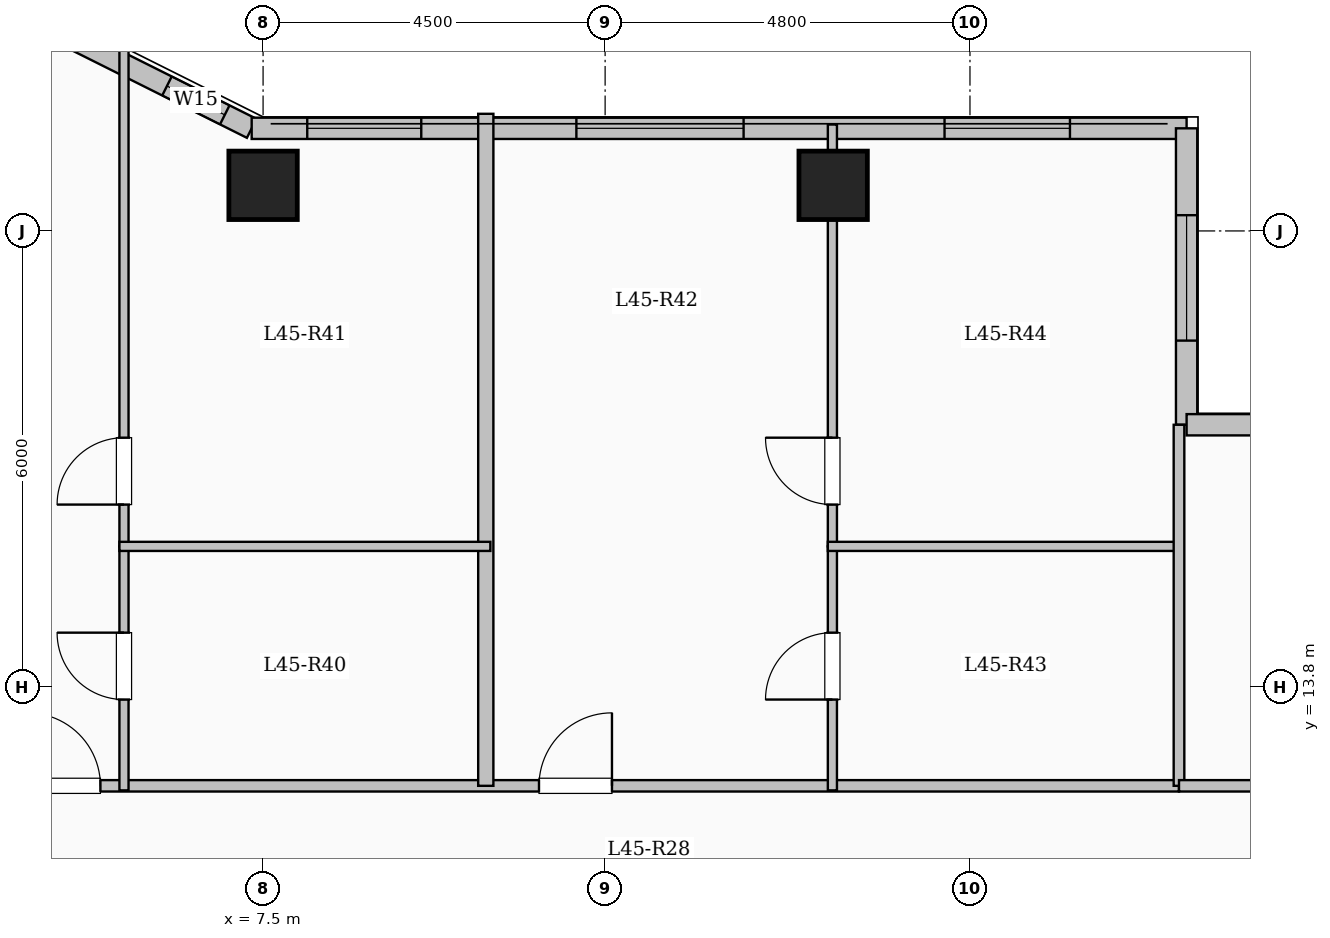
"""IFC4 building model, lengths in metres.
Left out: names, types, materials, properties, quantities, classifications, styles, units other than length and angle.
Written with IfcOpenShell. Run it as: python <this file> out.ifc"""

import sys

from ifc_helpers import new_model, si_unit, direction, frame, frame_2d, origin, origin_2d, place, context, subcontext, project, spatial, rectangle, extrude, element, fill, save


model = new_model("IFC4")
c1 = context("Model", 3, precision=1e-05, world=origin(), true_north=direction((0.0, 1.0)))
c2 = subcontext(c1, "Body", "Model", "MODEL_VIEW")
j1 = project(units=[si_unit("LENGTHUNIT", "METRE"), si_unit("PLANEANGLEUNIT", "RADIAN")], contexts=[c1])
p1 = place(None, origin())
s1 = spatial("IfcSite", under=j1, at=p1, CompositionType="ELEMENT")
p2 = place(p1, origin())
s2 = spatial("IfcBuilding", under=s1, at=p2, CompositionType="ELEMENT")
p3 = place(p2, frame((0.0, 0.0, 166.1)))
s3 = spatial("IfcBuildingStorey", under=s2, at=p3, CompositionType="ELEMENT", Elevation=166.1)
for number, where, z_axis, x_axis in (
    (1, (7.5, 20.4, 0.0), (0.0, 0.0, 1.0), (1.0, 0.0, 0.0)),
    (2, (15.0, 20.4, 0.0), (0.0, 0.0, 1.0), (1.0, 0.0, 0.0)),
):
    element("IfcColumn", number, at=place(p3, frame(where, z_axis=z_axis, x_axis=x_axis)), inside=s3, PredefinedType="COLUMN", context=c2, shape_type="SweptSolid", body=[
        extrude(rectangle(XDim=0.9, YDim=0.9, at=origin_2d()), origin(), (0.0, 0.0, 1.0), 3.35),
    ])
p4 = place(p3, frame((4.35, 22.65, 0.0), z_axis=(0.0, 0.0, 1.0), x_axis=(0.894427191, -0.4472135955, 0.0)))
e3 = element("IfcWall", 3, at=p4, inside=s3, PredefinedType="SOLIDWALL", context=c2, shape_type="SweptSolid", body=[
    extrude(rectangle(XDim=3.354, YDim=0.28, at=frame_2d((1.677, 0.0))), origin(), (0.0, 0.0, 1.0), 3.1),
])
p5 = place(p4, frame((2.108, 0.0, 0.95)))
e4 = element("IfcOpeningElement", 4, at=p5, cuts=e3, PredefinedType="OPENING", context=c2, shape_type="SweptSolid", body=[
    extrude(rectangle(XDim=0.85, YDim=1.5, at=frame_2d((0.425, 0.75))), frame((0.0, 0.15, 0.0), z_axis=(0.0, -1.0, 0.0), x_axis=(1.0, 0.0, 0.0)), (0.0, 0.0, 1.0), 0.3),
])
p6 = place(p3, frame((7.35, 21.15, 0.0), z_axis=(0.0, 0.0, 1.0), x_axis=(1.0, 0.0, 0.0)))
e5 = element("IfcWall", 5, at=p6, inside=s3, PredefinedType="SOLIDWALL", context=c2, shape_type="SweptSolid", body=[
    extrude(rectangle(XDim=12.3, YDim=0.28, at=frame_2d((6.15, 0.0))), origin(), (0.0, 0.0, 1.0), 3.1),
])
p7 = place(p6, frame((0.731, 0.0, 0.9)))
e6 = element("IfcOpeningElement", 6, at=p7, cuts=e5, PredefinedType="OPENING", context=c2, shape_type="SweptSolid", body=[
    extrude(rectangle(XDim=1.5, YDim=1.65, at=frame_2d((0.75, 0.825))), frame((0.0, 0.15, 0.0), z_axis=(0.0, -1.0, 0.0), x_axis=(1.0, 0.0, 0.0)), (0.0, 0.0, 1.0), 0.3),
])
p8 = place(p6, frame((4.272, 0.0, 0.9)))
e7 = element("IfcOpeningElement", 7, at=p8, cuts=e5, PredefinedType="OPENING", context=c2, shape_type="SweptSolid", body=[
    extrude(rectangle(XDim=2.2, YDim=1.75, at=frame_2d((1.1, 0.875))), frame((0.0, 0.15, 0.0), z_axis=(0.0, -1.0, 0.0), x_axis=(1.0, 0.0, 0.0)), (0.0, 0.0, 1.0), 0.3),
])
p9 = place(p6, frame((9.115, 0.0, 0.9)))
e8 = element("IfcOpeningElement", 8, at=p9, cuts=e5, PredefinedType="OPENING", context=c2, shape_type="SweptSolid", body=[
    extrude(rectangle(XDim=1.65, YDim=1.6, at=frame_2d((0.825, 0.8))), frame((0.0, 0.15, 0.0), z_axis=(0.0, -1.0, 0.0), x_axis=(1.0, 0.0, 0.0)), (0.0, 0.0, 1.0), 0.3),
])
p10 = place(p3, frame((19.65, 21.15, 0.0), z_axis=(0.0, 0.0, 1.0), x_axis=(0.0, -1.0, 0.0)))
e9 = element("IfcWall", 9, at=p10, inside=s3, PredefinedType="SOLIDWALL", context=c2, shape_type="SweptSolid", body=[
    extrude(rectangle(XDim=3.9, YDim=0.28, at=frame_2d((1.95, 0.0))), origin(), (0.0, 0.0, 1.0), 3.1),
])
p11 = place(p10, frame((1.143, 0.0, 0.9)))
e10 = element("IfcOpeningElement", 10, at=p11, cuts=e9, PredefinedType="OPENING", context=c2, shape_type="SweptSolid", body=[
    extrude(rectangle(XDim=1.65, YDim=1.6, at=frame_2d((0.825, 0.8))), frame((0.0, 0.15, 0.0), z_axis=(0.0, -1.0, 0.0), x_axis=(1.0, 0.0, 0.0)), (0.0, 0.0, 1.0), 0.3),
])
p12 = place(p3, frame((19.65, 17.25, 0.0), z_axis=(0.0, 0.0, 1.0), x_axis=(1.0, 0.0, 0.0)))
e11 = element("IfcWall", 11, at=p12, inside=s3, PredefinedType="SOLIDWALL", context=c2, shape_type="SweptSolid", body=[
    extrude(rectangle(XDim=5.4, YDim=0.28, at=frame_2d((2.7, 0.0))), origin(), (0.0, 0.0, 1.0), 3.1),
])
p13 = place(p12, frame((1.675, 0.0, 0.9)))
e12 = element("IfcOpeningElement", 12, at=p13, cuts=e11, PredefinedType="OPENING", context=c2, shape_type="SweptSolid", body=[
    extrude(rectangle(XDim=2.0, YDim=1.7, at=frame_2d((1.0, 0.85))), frame((0.0, 0.15, 0.0), z_axis=(0.0, -1.0, 0.0), x_axis=(1.0, 0.0, 0.0)), (0.0, 0.0, 1.0), 0.3),
])
p14 = place(p3, frame((3.85, 12.5, 0.0), z_axis=(0.0, 0.0, 1.0), x_axis=(1.0, 0.0, 0.0)))
e13 = element("IfcWall", 13, at=p14, inside=s3, PredefinedType="PARTITIONING", context=c2, shape_type="SweptSolid", body=[
    extrude(rectangle(XDim=15.7, YDim=0.15, at=frame_2d((7.85, 0.0))), origin(), (0.0, 0.0, 1.0), 3.1),
])
p15 = place(p14, frame((0.55, 0.0, 0.0)))
e14 = element("IfcOpeningElement", 14, at=p15, cuts=e13, PredefinedType="OPENING", context=c2, shape_type="SweptSolid", body=[
    extrude(rectangle(XDim=0.96, YDim=2.15, at=frame_2d((0.48, 1.075))), frame((0.0, 0.085, 0.0), z_axis=(0.0, -1.0, 0.0), x_axis=(1.0, 0.0, 0.0)), (0.0, 0.0, 1.0), 0.17),
])
p16 = place(p14, frame((7.28, 0.0, 0.0)))
e15 = element("IfcOpeningElement", 15, at=p16, cuts=e13, PredefinedType="OPENING", context=c2, shape_type="SweptSolid", body=[
    extrude(rectangle(XDim=0.96, YDim=2.15, at=frame_2d((0.48, 1.075))), frame((0.0, 0.085, 0.0), z_axis=(0.0, -1.0, 0.0), x_axis=(1.0, 0.0, 0.0)), (0.0, 0.0, 1.0), 0.17),
])
p17 = place(p3, frame((10.43, 12.5, 0.0), z_axis=(0.0, 0.0, 1.0), x_axis=(0.0, 1.0, 0.0)))
e16 = element("IfcWall", 16, at=p17, inside=s3, PredefinedType="SOLIDWALL", context=c2, shape_type="SweptSolid", body=[
    extrude(rectangle(XDim=8.841, YDim=0.2, at=frame_2d((4.42, 0.0))), origin(), (0.0, 0.0, 1.0), 3.1),
])
p18 = place(p3, frame((5.67, 12.44, 0.0), z_axis=(0.0, 0.0, 1.0), x_axis=(0.0, 1.0, 0.0)))
e17 = element("IfcWall", 17, at=p18, inside=s3, PredefinedType="PARTITIONING", context=c2, shape_type="SweptSolid", body=[
    extrude(rectangle(XDim=3.21, YDim=0.12, at=frame_2d((1.605, 0.0))), origin(), (0.0, 0.0, 1.0), 3.1),
])
p19 = place(p18, frame((1.195, 0.0, 0.0)))
e18 = element("IfcOpeningElement", 18, at=p19, cuts=e17, PredefinedType="OPENING", context=c2, shape_type="SweptSolid", body=[
    extrude(rectangle(XDim=0.88, YDim=2.1, at=frame_2d((0.44, 1.05))), frame((0.0, 0.07, 0.0), z_axis=(0.0, -1.0, 0.0), x_axis=(1.0, 0.0, 0.0)), (0.0, 0.0, 1.0), 0.14),
])
p20 = place(p3, frame((5.67, 15.65, 0.0), z_axis=(0.0, 0.0, 1.0), x_axis=(0.0, 1.0, 0.0)))
e19 = element("IfcWall", 19, at=p20, inside=s3, PredefinedType="PARTITIONING", context=c2, shape_type="SweptSolid", body=[
    extrude(rectangle(XDim=6.865, YDim=0.12, at=frame_2d((3.433, 0.0))), origin(), (0.0, 0.0, 1.0), 3.1),
])
p21 = place(p20, frame((0.55, 0.0, 0.0)))
e20 = element("IfcOpeningElement", 20, at=p21, cuts=e19, PredefinedType="OPENING", context=c2, shape_type="SweptSolid", body=[
    extrude(rectangle(XDim=0.88, YDim=2.1, at=frame_2d((0.44, 1.05))), frame((0.0, 0.07, 0.0), z_axis=(0.0, -1.0, 0.0), x_axis=(1.0, 0.0, 0.0)), (0.0, 0.0, 1.0), 0.14),
])
p22 = place(p3, frame((5.61, 15.65, 0.0), z_axis=(0.0, 0.0, 1.0), x_axis=(1.0, 0.0, 0.0)))
e21 = element("IfcWall", 21, at=p22, inside=s3, PredefinedType="PARTITIONING", context=c2, shape_type="SweptSolid", body=[
    extrude(rectangle(XDim=4.88, YDim=0.12, at=frame_2d((2.44, 0.0))), origin(), (0.0, 0.0, 1.0), 2.685),
])
p23 = place(p3, frame((14.99, 12.44, 0.0), z_axis=(0.0, 0.0, 1.0), x_axis=(0.0, 1.0, 0.0)))
e22 = element("IfcWall", 22, at=p23, inside=s3, PredefinedType="PARTITIONING", context=c2, shape_type="SweptSolid", body=[
    extrude(rectangle(XDim=3.21, YDim=0.12, at=frame_2d((1.605, 0.0))), origin(), (0.0, 0.0, 1.0), 2.585),
])
p24 = place(p23, frame((1.195, 0.0, 0.0)))
e23 = element("IfcOpeningElement", 23, at=p24, cuts=e22, PredefinedType="OPENING", context=c2, shape_type="SweptSolid", body=[
    extrude(rectangle(XDim=0.88, YDim=2.1, at=frame_2d((0.44, 1.05))), frame((0.0, 0.07, 0.0), z_axis=(0.0, -1.0, 0.0), x_axis=(1.0, 0.0, 0.0)), (0.0, 0.0, 1.0), 0.14),
])
p25 = place(p3, frame((14.99, 15.65, 0.0), z_axis=(0.0, 0.0, 1.0), x_axis=(0.0, 1.0, 0.0)))
e24 = element("IfcWall", 24, at=p25, inside=s3, PredefinedType="PARTITIONING", context=c2, shape_type="SweptSolid", body=[
    extrude(rectangle(XDim=5.55, YDim=0.12, at=frame_2d((2.775, 0.0))), origin(), (0.0, 0.0, 1.0), 2.585),
])
p26 = place(p25, frame((0.55, 0.0, 0.0)))
e25 = element("IfcOpeningElement", 25, at=p26, cuts=e24, PredefinedType="OPENING", context=c2, shape_type="SweptSolid", body=[
    extrude(rectangle(XDim=0.88, YDim=2.1, at=frame_2d((0.44, 1.05))), frame((0.0, 0.07, 0.0), z_axis=(0.0, -1.0, 0.0), x_axis=(1.0, 0.0, 0.0)), (0.0, 0.0, 1.0), 0.14),
])
p27 = place(p3, frame((14.93, 15.65, 0.0), z_axis=(0.0, 0.0, 1.0), x_axis=(1.0, 0.0, 0.0)))
e26 = element("IfcWall", 26, at=p27, inside=s3, PredefinedType="PARTITIONING", context=c2, shape_type="SweptSolid", body=[
    extrude(rectangle(XDim=4.68, YDim=0.12, at=frame_2d((2.34, 0.0))), origin(), (0.0, 0.0, 1.0), 3.1),
])
p28 = place(p3, frame((19.55, 12.5, 0.0), z_axis=(0.0, 0.0, 1.0), x_axis=(0.0, 1.0, 0.0)))
e27 = element("IfcWall", 27, at=p28, inside=s3, PredefinedType="PARTITIONING", context=c2, shape_type="SweptSolid", body=[
    extrude(rectangle(XDim=4.75, YDim=0.14, at=frame_2d((2.375, 0.0))), origin(), (0.0, 0.0, 1.0), 3.1),
])
p29 = place(p3, frame((19.55, 12.5, 0.0), z_axis=(0.0, 0.0, 1.0), x_axis=(1.0, 0.0, 0.0)))
e28 = element("IfcWall", 28, at=p29, inside=s3, PredefinedType="PARTITIONING", context=c2, shape_type="SweptSolid", body=[
    extrude(rectangle(XDim=5.53, YDim=0.15, at=frame_2d((2.765, 0.0))), origin(), (0.0, 0.0, 1.0), 3.1),
])
p30 = place(p29, frame((2.29, 0.0, 0.0)))
e29 = element("IfcOpeningElement", 29, at=p30, cuts=e28, PredefinedType="OPENING", context=c2, shape_type="SweptSolid", body=[
    extrude(rectangle(XDim=0.95, YDim=2.15, at=frame_2d((0.475, 1.075))), frame((0.0, 0.085, 0.0), z_axis=(0.0, -1.0, 0.0), x_axis=(1.0, 0.0, 0.0)), (0.0, 0.0, 1.0), 0.17),
])
p31 = place(p5, origin())
e30 = element("IfcWindow", 30, at=p31, inside=s3, PartitioningType="SINGLE_PANEL", PredefinedType="WINDOW", context=c2, shape_type="SweptSolid", body=[
    extrude(rectangle(XDim=0.85, YDim=1.5, at=frame_2d((0.425, 0.75))), frame((0.0, 0.03, 0.0), z_axis=(0.0, -1.0, 0.0), x_axis=(1.0, 0.0, 0.0)), (0.0, 0.0, 1.0), 0.06),
])
fill(e4, e30)
p32 = place(p7, origin())
e31 = element("IfcWindow", 31, at=p32, inside=s3, PartitioningType="SINGLE_PANEL", PredefinedType="WINDOW", context=c2, shape_type="SweptSolid", body=[
    extrude(rectangle(XDim=1.5, YDim=1.65, at=frame_2d((0.75, 0.825))), frame((0.0, 0.03, 0.0), z_axis=(0.0, -1.0, 0.0), x_axis=(1.0, 0.0, 0.0)), (0.0, 0.0, 1.0), 0.06),
])
fill(e6, e31)
p33 = place(p8, origin())
e32 = element("IfcWindow", 32, at=p33, inside=s3, PartitioningType="SINGLE_PANEL", PredefinedType="WINDOW", context=c2, shape_type="SweptSolid", body=[
    extrude(rectangle(XDim=2.2, YDim=1.75, at=frame_2d((1.1, 0.875))), frame((0.0, 0.03, 0.0), z_axis=(0.0, -1.0, 0.0), x_axis=(1.0, 0.0, 0.0)), (0.0, 0.0, 1.0), 0.06),
])
fill(e7, e32)
p34 = place(p9, origin())
e33 = element("IfcWindow", 33, at=p34, inside=s3, PartitioningType="SINGLE_PANEL", PredefinedType="WINDOW", context=c2, shape_type="SweptSolid", body=[
    extrude(rectangle(XDim=1.65, YDim=1.6, at=frame_2d((0.825, 0.8))), frame((0.0, 0.03, 0.0), z_axis=(0.0, -1.0, 0.0), x_axis=(1.0, 0.0, 0.0)), (0.0, 0.0, 1.0), 0.06),
])
fill(e8, e33)
p35 = place(p11, origin())
e34 = element("IfcWindow", 34, at=p35, inside=s3, PartitioningType="SINGLE_PANEL", PredefinedType="WINDOW", context=c2, shape_type="SweptSolid", body=[
    extrude(rectangle(XDim=1.65, YDim=1.6, at=frame_2d((0.825, 0.8))), frame((0.0, 0.03, 0.0), z_axis=(0.0, -1.0, 0.0), x_axis=(1.0, 0.0, 0.0)), (0.0, 0.0, 1.0), 0.06),
])
fill(e10, e34)
p36 = place(p15, origin())
e35 = element("IfcDoor", 35, at=p36, inside=s3, OperationType="SINGLE_SWING_LEFT", PredefinedType="DOOR", context=c2, shape_type="SweptSolid", body=[
    extrude(rectangle(XDim=0.96, YDim=2.15, at=frame_2d((0.48, 1.075))), frame((0.0, 0.025, 0.0), z_axis=(0.0, -1.0, 0.0), x_axis=(1.0, 0.0, 0.0)), (0.0, 0.0, 1.0), 0.05),
])
fill(e14, e35)
p37 = place(p19, origin())
e36 = element("IfcDoor", 36, at=p37, inside=s3, OperationType="SINGLE_SWING_RIGHT", PredefinedType="DOOR", context=c2, shape_type="SweptSolid", body=[
    extrude(rectangle(XDim=0.88, YDim=2.1, at=frame_2d((0.44, 1.05))), frame((0.0, 0.025, 0.0), z_axis=(0.0, -1.0, 0.0), x_axis=(1.0, 0.0, 0.0)), (0.0, 0.0, 1.0), 0.05),
])
fill(e18, e36)
p38 = place(p21, origin())
e37 = element("IfcDoor", 37, at=p38, inside=s3, OperationType="SINGLE_SWING_LEFT", PredefinedType="DOOR", context=c2, shape_type="SweptSolid", body=[
    extrude(rectangle(XDim=0.88, YDim=2.1, at=frame_2d((0.44, 1.05))), frame((0.0, 0.025, 0.0), z_axis=(0.0, -1.0, 0.0), x_axis=(1.0, 0.0, 0.0)), (0.0, 0.0, 1.0), 0.05),
])
fill(e20, e37)
p39 = place(p16, origin())
e38 = element("IfcDoor", 38, at=p39, inside=s3, OperationType="SINGLE_SWING_RIGHT", PredefinedType="DOOR", context=c2, shape_type="SweptSolid", body=[
    extrude(rectangle(XDim=0.96, YDim=2.15, at=frame_2d((0.48, 1.075))), frame((0.0, 0.025, 0.0), z_axis=(0.0, -1.0, 0.0), x_axis=(1.0, 0.0, 0.0)), (0.0, 0.0, 1.0), 0.05),
])
fill(e15, e38)
p40 = place(p24, origin())
e39 = element("IfcDoor", 39, at=p40, inside=s3, OperationType="SINGLE_SWING_LEFT", PredefinedType="DOOR", context=c2, shape_type="SweptSolid", body=[
    extrude(rectangle(XDim=0.88, YDim=2.1, at=frame_2d((0.44, 1.05))), frame((0.0, 0.025, 0.0), z_axis=(0.0, -1.0, 0.0), x_axis=(1.0, 0.0, 0.0)), (0.0, 0.0, 1.0), 0.05),
])
fill(e23, e39)
p41 = place(p26, origin())
e40 = element("IfcDoor", 40, at=p41, inside=s3, OperationType="SINGLE_SWING_RIGHT", PredefinedType="DOOR", context=c2, shape_type="SweptSolid", body=[
    extrude(rectangle(XDim=0.88, YDim=2.1, at=frame_2d((0.44, 1.05))), frame((0.0, 0.025, 0.0), z_axis=(0.0, -1.0, 0.0), x_axis=(1.0, 0.0, 0.0)), (0.0, 0.0, 1.0), 0.05),
])
fill(e25, e40)
save(model, sys.argv[1])
